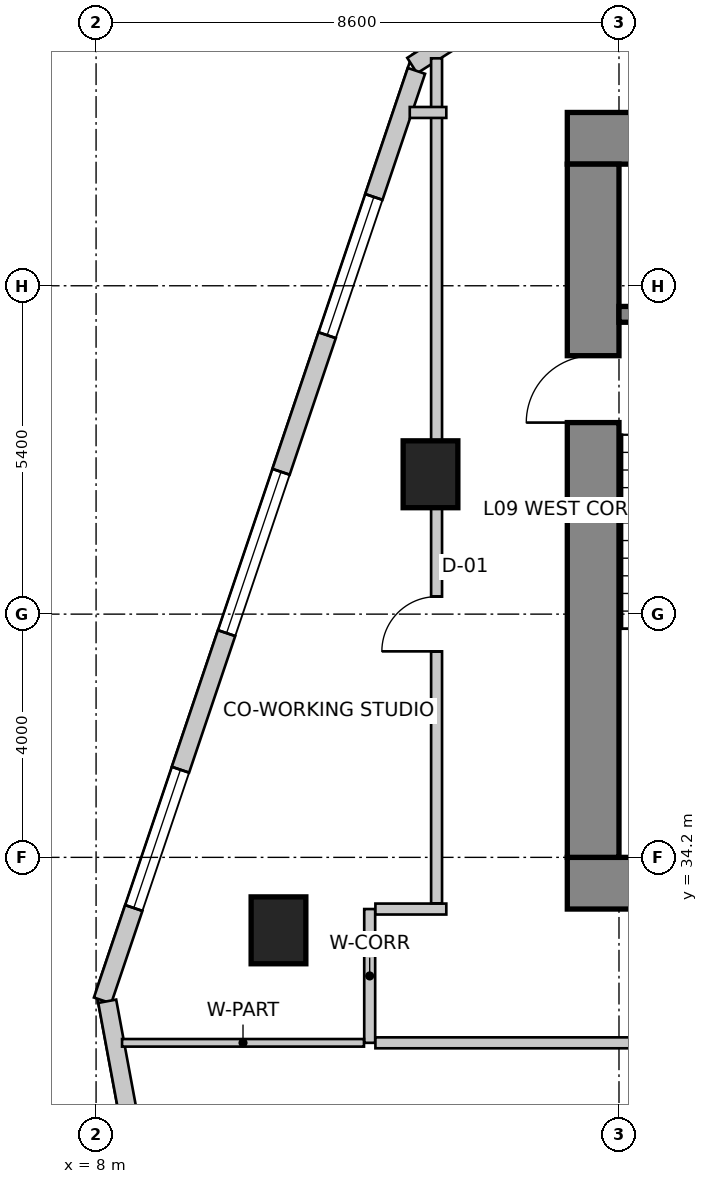
"""IFC4 building model, lengths in metres.
Left out: names, types, materials, properties, quantities, classifications, styles, units other than length and angle.
Written with IfcOpenShell. Run it as: python <this file> out.ifc"""

import sys

from ifc_helpers import new_model, si_unit, direction, frame, frame_2d, origin, origin_2d, place, context, subcontext, project, spatial, rectangle, extrude, source, transform, mapped, element, fill, save


model = new_model("IFC4")
c1 = context("Model", 3, precision=1e-05, world=origin(), true_north=direction((0.0, 1.0)))
c2 = subcontext(c1, "Body", "Model", "MODEL_VIEW")
j1 = project(units=[si_unit("LENGTHUNIT", "METRE"), si_unit("PLANEANGLEUNIT", "RADIAN")], contexts=[c1])
p1 = place(None, origin())
s1 = spatial("IfcSite", under=j1, at=p1, CompositionType="ELEMENT")
p2 = place(p1, origin())
s2 = spatial("IfcBuilding", under=s1, at=p2, CompositionType="ELEMENT")
p3 = place(p2, frame((0.0, 0.0, 39.0)))
s3 = spatial("IfcBuildingStorey", under=s2, at=p3, CompositionType="ELEMENT", Elevation=39.0)
p4 = place(p3, frame((15.75, 46.025, 0.0), z_axis=(0.0, 0.0, 1.0), x_axis=(1.0, 0.0, 0.0)))
e1 = element("IfcWall", 1, at=p4, inside=s3, PredefinedType="SHEAR", context=c2, shape_type="SweptSolid", body=[
    extrude(rectangle(XDim=16.1, YDim=0.85, at=frame_2d((8.05, 0.0))), origin(), (0.0, 0.0, 1.0), 4.0),
])
p5 = place(p3, frame((15.75, 33.775, 0.0), z_axis=(0.0, 0.0, 1.0), x_axis=(1.0, 0.0, 0.0)))
e2 = element("IfcWall", 2, at=p5, inside=s3, PredefinedType="SHEAR", context=c2, shape_type="SweptSolid", body=[
    extrude(rectangle(XDim=16.1, YDim=0.85, at=frame_2d((8.05, 0.0))), origin(), (0.0, 0.0, 1.0), 4.0),
])
m1 = source(origin(), c2, "Body", "SweptSolid", [
    extrude(rectangle(XDim=1.3, YDim=2.15, at=frame_2d((0.65, 1.075))), frame((0.0, 0.435, 0.0), z_axis=(0.0, -1.0, 0.0), x_axis=(1.0, 0.0, 0.0)), (0.0, 0.0, 1.0), 0.87),
])
p6 = place(p5, frame((10.18, 0.0, 0.0)))
e3 = element("IfcOpeningElement", 3, at=p6, cuts=e2, PredefinedType="OPENING", context=c2, shape_type="MappedRepresentation", body=[
    mapped(m1, transform((0.0, 0.0, 0.0), scale=1.0)),
])
p7 = place(p3, frame((16.175, 34.2, 0.0), z_axis=(0.0, 0.0, 1.0), x_axis=(0.0, 1.0, 0.0)))
e4 = element("IfcWall", 4, at=p7, inside=s3, PredefinedType="SHEAR", context=c2, shape_type="SweptSolid", body=[
    extrude(rectangle(XDim=11.4, YDim=0.85, at=frame_2d((5.7, 0.0))), origin(), (0.0, 0.0, 1.0), 4.0),
])
m2 = source(origin(), c2, "Body", "SweptSolid", [
    extrude(rectangle(XDim=1.1, YDim=2.15, at=frame_2d((0.55, 1.075))), frame((0.0, 0.435, 0.0), z_axis=(0.0, -1.0, 0.0), x_axis=(1.0, 0.0, 0.0)), (0.0, 0.0, 1.0), 0.87),
])
p8 = place(p7, frame((7.15, 0.0, 0.0)))
e5 = element("IfcOpeningElement", 5, at=p8, cuts=e4, PredefinedType="OPENING", context=c2, shape_type="MappedRepresentation", body=[
    mapped(m2, transform((0.0, 0.0, 0.0), scale=1.0)),
])
p9 = place(p3, frame((16.6, 43.13, 0.0), z_axis=(0.0, 0.0, 1.0), x_axis=(1.0, 0.0, 0.0)))
e6 = element("IfcWall", 6, at=p9, inside=s3, PredefinedType="SHEAR", context=c2, shape_type="SweptSolid", body=[
    extrude(rectangle(XDim=3.5, YDim=0.26, at=frame_2d((1.75, 0.0))), origin(), (0.0, 0.0, 1.0), 4.0),
])
m3 = source(origin(), c2, "Body", "SweptSolid", [
    extrude(rectangle(XDim=0.9, YDim=1.1, at=origin_2d()), origin(), (0.0, 0.0, 1.0), 4.0),
])
for number, where, z_axis, x_axis in (
    (7, (11.0, 33.0, 0.0), (0.0, 0.0, 1.0), (1.0, 0.0, 0.0)),
    (8, (13.5, 40.5, 0.0), (0.0, 0.0, 1.0), (1.0, 0.0, 0.0)),
):
    element("IfcColumn", number, at=place(p3, frame(where, z_axis=z_axis, x_axis=x_axis)), inside=s3, PredefinedType="COLUMN", context=c2, shape_type="MappedRepresentation", body=[
        mapped(m3, transform((0.0, 0.0, 0.0), scale=1.0)),
    ])
p10 = place(p3, frame((21.875, 52.743, 0.0), z_axis=(0.0, 0.0, 1.0), x_axis=(-0.843647802826, -0.536896996441, 0.0)))
e9 = element("IfcWall", 9, at=p10, inside=s3, PredefinedType="SOLIDWALL", context=c2, shape_type="SweptSolid", body=[
    extrude(rectangle(XDim=10.284, YDim=0.3, at=frame_2d((5.142, 0.0))), origin(), (0.0, 0.0, 1.0), 3.75),
])
m4 = source(origin(), c2, "Body", "SweptSolid", [
    extrude(rectangle(XDim=1.2, YDim=1.6, at=frame_2d((0.6, 0.8))), frame((0.0, 0.16, 0.0), z_axis=(0.0, -1.0, 0.0), x_axis=(1.0, 0.0, 0.0)), (0.0, 0.0, 1.0), 0.32),
])
p11 = place(p10, frame((0.479, 0.0, 0.85)))
e10 = element("IfcOpeningElement", 10, at=p11, cuts=e9, PredefinedType="OPENING", context=c2, shape_type="MappedRepresentation", body=[
    mapped(m4, transform((0.0, 0.0, 0.0), scale=1.0)),
])
m5 = source(origin(), c2, "Body", "SweptSolid", [
    extrude(rectangle(XDim=2.8, YDim=2.4, at=frame_2d((1.4, 1.2))), frame((0.0, 0.16, 0.0), z_axis=(0.0, -1.0, 0.0), x_axis=(1.0, 0.0, 0.0)), (0.0, 0.0, 1.0), 0.32),
])
p12 = place(p10, frame((3.342, 0.0, 0.85)))
e11 = element("IfcOpeningElement", 11, at=p12, cuts=e9, PredefinedType="OPENING", context=c2, shape_type="MappedRepresentation", body=[
    mapped(m5, transform((0.0, 0.0, 0.0), scale=1.0)),
])
m6 = source(origin(), c2, "Body", "SweptSolid", [
    extrude(rectangle(XDim=1.8, YDim=2.1, at=frame_2d((0.9, 1.05))), frame((0.0, 0.16, 0.0), z_axis=(0.0, -1.0, 0.0), x_axis=(1.0, 0.0, 0.0)), (0.0, 0.0, 1.0), 0.32),
])
p13 = place(p10, frame((7.754, 0.0, 0.85)))
e12 = element("IfcOpeningElement", 12, at=p13, cuts=e9, PredefinedType="OPENING", context=c2, shape_type="MappedRepresentation", body=[
    mapped(m6, transform((0.0, 0.0, 0.0), scale=1.0)),
])
p14 = place(p3, frame((13.269, 47.134, 0.0), z_axis=(0.0, 0.0, 1.0), x_axis=(-0.319920423265, -0.947444416722, 0.0)))
e13 = element("IfcWall", 13, at=p14, inside=s3, PredefinedType="SOLIDWALL", context=c2, shape_type="SweptSolid", body=[
    extrude(rectangle(XDim=16.135, YDim=0.3, at=frame_2d((8.067, 0.0))), origin(), (0.0, 0.0, 1.0), 3.75),
])
m7 = source(origin(), c2, "Body", "SweptSolid", [
    extrude(rectangle(XDim=2.4, YDim=2.2, at=frame_2d((1.2, 1.1))), frame((0.0, 0.16, 0.0), z_axis=(0.0, -1.0, 0.0), x_axis=(1.0, 0.0, 0.0)), (0.0, 0.0, 1.0), 0.32),
])
p15 = place(p14, frame((2.188, 0.0, 0.85)))
e14 = element("IfcOpeningElement", 14, at=p15, cuts=e13, PredefinedType="OPENING", context=c2, shape_type="MappedRepresentation", body=[
    mapped(m7, transform((0.0, 0.0, 0.0), scale=1.0)),
])
p16 = place(p14, frame((6.959, 0.0, 0.85)))
e15 = element("IfcOpeningElement", 15, at=p16, cuts=e13, PredefinedType="OPENING", context=c2, shape_type="MappedRepresentation", body=[
    mapped(m5, transform((0.0, 0.0, 0.0), scale=1.0)),
])
p17 = place(p14, frame((12.13, 0.0, 0.85)))
e16 = element("IfcOpeningElement", 16, at=p17, cuts=e13, PredefinedType="OPENING", context=c2, shape_type="MappedRepresentation", body=[
    mapped(m7, transform((0.0, 0.0, 0.0), scale=1.0)),
])
p18 = place(p3, frame((8.183, 31.833, 0.0), z_axis=(0.0, 0.0, 1.0), x_axis=(0.18216364648, -0.983268226834, 0.0)))
e17 = element("IfcWall", 17, at=p18, inside=s3, PredefinedType="SOLIDWALL", context=c2, shape_type="SweptSolid", body=[
    extrude(rectangle(XDim=26.678, YDim=0.3, at=frame_2d((13.339, 0.0))), origin(), (0.0, 0.0, 1.0), 3.75),
])
p19 = place(p18, frame((2.952, 0.0, 0.85)))
e18 = element("IfcOpeningElement", 18, at=p19, cuts=e17, PredefinedType="OPENING", context=c2, shape_type="MappedRepresentation", body=[
    mapped(m5, transform((0.0, 0.0, 0.0), scale=1.0)),
])
p20 = place(p18, frame((8.986, 0.0, 0.85)))
e19 = element("IfcOpeningElement", 19, at=p20, cuts=e17, PredefinedType="OPENING", context=c2, shape_type="MappedRepresentation", body=[
    mapped(m5, transform((0.0, 0.0, 0.0), scale=1.0)),
])
p21 = place(p18, frame((13.543, 0.0, 0.85)))
e20 = element("IfcOpeningElement", 20, at=p21, cuts=e17, PredefinedType="OPENING", context=c2, shape_type="MappedRepresentation", body=[
    mapped(m7, transform((0.0, 0.0, 0.0), scale=1.0)),
])
p22 = place(p18, frame((18.211, 0.0, 0.85)))
e21 = element("IfcOpeningElement", 21, at=p22, cuts=e17, PredefinedType="OPENING", context=c2, shape_type="MappedRepresentation", body=[
    mapped(m5, transform((0.0, 0.0, 0.0), scale=1.0)),
])
p23 = place(p18, frame((22.909, 0.0, 0.85)))
e22 = element("IfcOpeningElement", 22, at=p23, cuts=e17, PredefinedType="OPENING", context=c2, shape_type="MappedRepresentation", body=[
    mapped(m7, transform((0.0, 0.0, 0.0), scale=1.0)),
])
p24 = place(p3, frame((12.5, 31.15, 0.0), z_axis=(0.0, 0.0, 1.0), x_axis=(0.0, 1.0, 0.0)))
e23 = element("IfcWall", 23, at=p24, inside=s3, PredefinedType="PARTITIONING", context=c2, shape_type="SweptSolid", body=[
    extrude(rectangle(XDim=2.2, YDim=0.18, at=frame_2d((1.1, 0.0))), origin(), (0.0, 0.0, 1.0), 3.335),
])
p25 = place(p3, frame((12.594, 33.35, 0.0), z_axis=(0.0, 0.0, 1.0), x_axis=(1.0, 0.0, 0.0)))
e24 = element("IfcWall", 24, at=p25, inside=s3, PredefinedType="PARTITIONING", context=c2, shape_type="SweptSolid", body=[
    extrude(rectangle(XDim=1.166, YDim=0.18, at=frame_2d((0.583, 0.0))), origin(), (0.0, 0.0, 1.0), 3.75),
])
p26 = place(p3, frame((17.96, 31.15, 0.0), z_axis=(0.0, 0.0, 1.0), x_axis=(-1.0, 0.0, 0.0)))
e25 = element("IfcWall", 25, at=p26, inside=s3, PredefinedType="PARTITIONING", context=c2, shape_type="SweptSolid", body=[
    extrude(rectangle(XDim=5.366, YDim=0.18, at=frame_2d((2.683, 0.0))), origin(), (0.0, 0.0, 1.0), 3.335),
])
p27 = place(p3, frame((13.6, 33.444, 0.0), z_axis=(0.0, 0.0, 1.0), x_axis=(0.0, 1.0, 0.0)))
e26 = element("IfcWall", 26, at=p27, inside=s3, PredefinedType="PARTITIONING", context=c2, shape_type="SweptSolid", body=[
    extrude(rectangle(XDim=13.896, YDim=0.18, at=frame_2d((6.948, 0.0))), origin(), (0.0, 0.0, 1.0), 2.892),
])
m8 = source(origin(), c2, "Body", "SweptSolid", [
    extrude(rectangle(XDim=0.9, YDim=2.15, at=frame_2d((0.45, 1.075))), frame((0.0, 0.1, 0.0), z_axis=(0.0, -1.0, 0.0), x_axis=(1.0, 0.0, 0.0)), (0.0, 0.0, 1.0), 0.2),
])
p28 = place(p27, frame((4.144, 0.0, 0.0)))
e27 = element("IfcOpeningElement", 27, at=p28, cuts=e26, PredefinedType="OPENING", context=c2, shape_type="MappedRepresentation", body=[
    mapped(m8, transform((0.0, 0.0, 0.0), scale=1.0)),
])
p29 = place(p3, frame((13.76, 46.45, 0.0), z_axis=(0.0, 0.0, 1.0), x_axis=(-1.0, 0.0, 0.0)))
e28 = element("IfcWall", 28, at=p29, inside=s3, PredefinedType="PARTITIONING", context=c2, shape_type="SweptSolid", body=[
    extrude(rectangle(XDim=0.601, YDim=0.18, at=frame_2d((0.301, 0.0))), origin(), (0.0, 0.0, 1.0), 3.75),
])
p30 = place(p3, frame((12.406, 31.15, 0.0), z_axis=(0.0, 0.0, 1.0), x_axis=(-1.0, 0.0, 0.0)))
e29 = element("IfcWall", 29, at=p30, inside=s3, PredefinedType="PARTITIONING", context=c2, shape_type="SweptSolid", body=[
    extrude(rectangle(XDim=3.979, YDim=0.125, at=frame_2d((1.99, 0.0))), origin(), (0.0, 0.0, 1.0), 2.892),
])
m9 = source(origin(), c2, "Body", "SweptSolid", [
    extrude(rectangle(XDim=2.4, YDim=2.2, at=frame_2d((1.2, 1.1))), frame((0.0, -0.015, 0.0), z_axis=(0.0, -1.0, 0.0), x_axis=(1.0, 0.0, 0.0)), (0.0, 0.0, 1.0), 0.06),
])
p31 = place(p15, origin())
e30 = element("IfcWindow", 30, at=p31, inside=s3, PartitioningType="SINGLE_PANEL", PredefinedType="WINDOW", context=c2, shape_type="MappedRepresentation", body=[
    mapped(m9, transform((0.0, 0.0, 0.0), scale=1.0)),
])
fill(e14, e30)
m10 = source(origin(), c2, "Body", "SweptSolid", [
    extrude(rectangle(XDim=2.8, YDim=2.4, at=frame_2d((1.4, 1.2))), frame((0.0, -0.015, 0.0), z_axis=(0.0, -1.0, 0.0), x_axis=(1.0, 0.0, 0.0)), (0.0, 0.0, 1.0), 0.06),
])
p32 = place(p16, origin())
e31 = element("IfcWindow", 31, at=p32, inside=s3, PartitioningType="SINGLE_PANEL", PredefinedType="WINDOW", context=c2, shape_type="MappedRepresentation", body=[
    mapped(m10, transform((0.0, 0.0, 0.0), scale=1.0)),
])
fill(e15, e31)
p33 = place(p17, origin())
e32 = element("IfcWindow", 32, at=p33, inside=s3, PartitioningType="SINGLE_PANEL", PredefinedType="WINDOW", context=c2, shape_type="MappedRepresentation", body=[
    mapped(m9, transform((0.0, 0.0, 0.0), scale=1.0)),
])
fill(e16, e32)
m11 = source(origin(), c2, "Body", "SweptSolid", [
    extrude(rectangle(XDim=1.1, YDim=2.15, at=frame_2d((0.55, 1.075))), frame((0.0, 0.025, 0.0), z_axis=(0.0, -1.0, 0.0), x_axis=(1.0, 0.0, 0.0)), (0.0, 0.0, 1.0), 0.05),
])
p34 = place(p8, origin())
e33 = element("IfcDoor", 33, at=p34, inside=s3, OperationType="SINGLE_SWING_LEFT", PredefinedType="DOOR", context=c2, shape_type="MappedRepresentation", body=[
    mapped(m11, transform((0.0, 0.0, 0.0), scale=1.0)),
])
fill(e5, e33)
m12 = source(origin(), c2, "Body", "SweptSolid", [
    extrude(rectangle(XDim=0.9, YDim=2.15, at=frame_2d((0.45, 1.075))), frame((0.0, 0.025, 0.0), z_axis=(0.0, -1.0, 0.0), x_axis=(1.0, 0.0, 0.0)), (0.0, 0.0, 1.0), 0.05),
])
p35 = place(p28, origin())
e34 = element("IfcDoor", 34, at=p35, inside=s3, OperationType="SINGLE_SWING_LEFT", PredefinedType="DOOR", context=c2, shape_type="MappedRepresentation", body=[
    mapped(m12, transform((0.0, 0.0, 0.0), scale=1.0)),
])
fill(e27, e34)
save(model, sys.argv[1])
